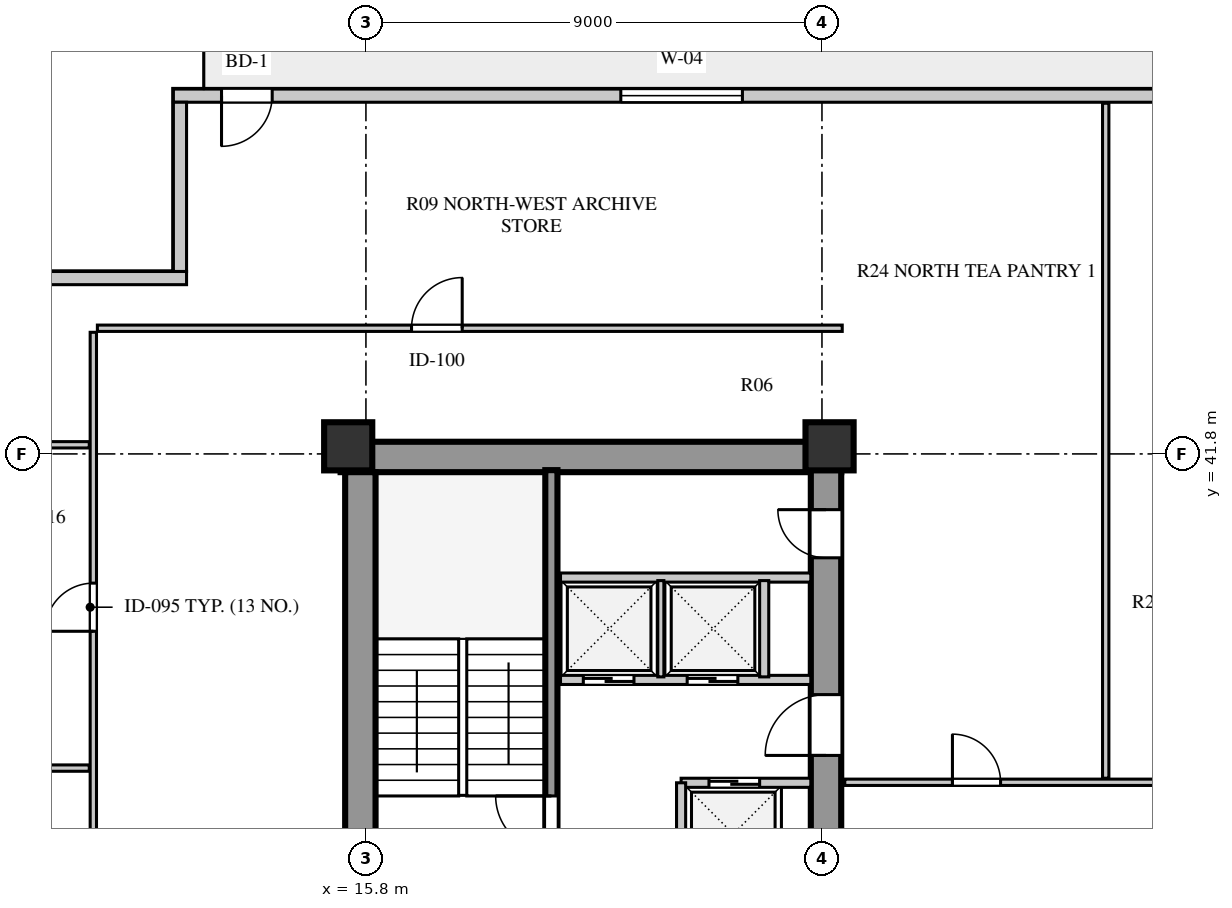
"""IFC4 building model, lengths in metres.
Left out: names, types, materials, properties, quantities, classifications, styles, units other than length and angle.
Written with IfcOpenShell. Run it as: python <this file> out.ifc"""

import sys

from ifc_helpers import new_model, si_unit, direction, frame, frame_2d, origin, origin_2d, place, context, subcontext, project, spatial, rectangle, extrude, element, fill, save


model = new_model("IFC4")
c1 = context("Model", 3, precision=1e-05, world=origin(), true_north=direction((0.0, 1.0)))
c2 = subcontext(c1, "Body", "Model", "MODEL_VIEW")
j1 = project(units=[si_unit("LENGTHUNIT", "METRE"), si_unit("PLANEANGLEUNIT", "RADIAN")], contexts=[c1])
p1 = place(None, origin())
s1 = spatial("IfcSite", under=j1, at=p1, CompositionType="ELEMENT")
p2 = place(p1, origin())
s2 = spatial("IfcBuilding", under=s1, at=p2, CompositionType="ELEMENT")
p3 = place(p2, frame((0.0, 0.0, 90.0)))
s3 = spatial("IfcBuildingStorey", under=s2, at=p3, CompositionType="ELEMENT", Elevation=90.0)
p4 = place(p3, frame((15.3, 41.74, 0.0), z_axis=(0.0, 0.0, 1.0), x_axis=(1.0, 0.0, 0.0)))
e1 = element("IfcWall", 1, at=p4, inside=s3, PredefinedType="SHEAR", context=c2, shape_type="SweptSolid", body=[
    extrude(rectangle(XDim=9.88, YDim=0.6, at=frame_2d((4.94, 0.0))), origin(), (0.0, 0.0, 1.0), 3.7),
])
p5 = place(p3, frame((15.69, 15.81, 0.0), z_axis=(0.0, 0.0, 1.0), x_axis=(0.0, 1.0, 0.0)))
e2 = element("IfcWall", 2, at=p5, inside=s3, PredefinedType="SHEAR", context=c2, shape_type="SweptSolid", body=[
    extrude(rectangle(XDim=25.63, YDim=0.6, at=frame_2d((12.815, 0.0))), origin(), (0.0, 0.0, 1.0), 3.7),
])
p6 = place(p3, frame((24.88, 15.74, 0.0), z_axis=(0.0, 0.0, 1.0), x_axis=(0.0, 1.0, 0.0)))
e3 = element("IfcWall", 3, at=p6, inside=s3, PredefinedType="SHEAR", context=c2, shape_type="SweptSolid", body=[
    extrude(rectangle(XDim=25.76, YDim=0.6, at=frame_2d((12.88, 0.0))), origin(), (0.0, 0.0, 1.0), 3.7),
])
p7 = place(p6, frame((1.61, 0.0, 0.0)))
e4 = element("IfcOpeningElement", 4, at=p7, cuts=e3, PredefinedType="OPENING", context=c2, shape_type="SweptSolid", body=[
    extrude(rectangle(XDim=1.2, YDim=2.1, at=frame_2d((0.6, 1.05))), frame((0.0, 0.31, 0.0), z_axis=(0.0, -1.0, 0.0), x_axis=(1.0, 0.0, 0.0)), (0.0, 0.0, 1.0), 0.62),
])
p8 = place(p6, frame((6.78, 0.0, 0.0)))
e5 = element("IfcOpeningElement", 5, at=p8, cuts=e3, PredefinedType="OPENING", context=c2, shape_type="SweptSolid", body=[
    extrude(rectangle(XDim=0.85, YDim=2.06, at=frame_2d((0.425, 1.03))), frame((0.0, 0.31, 0.0), z_axis=(0.0, -1.0, 0.0), x_axis=(1.0, 0.0, 0.0)), (0.0, 0.0, 1.0), 0.62),
])
p9 = place(p6, frame((12.11, 0.0, 0.0)))
e6 = element("IfcOpeningElement", 6, at=p9, cuts=e3, PredefinedType="OPENING", context=c2, shape_type="SweptSolid", body=[
    extrude(rectangle(XDim=1.5, YDim=2.12, at=frame_2d((0.75, 1.06))), frame((0.0, 0.31, 0.0), z_axis=(0.0, -1.0, 0.0), x_axis=(1.0, 0.0, 0.0)), (0.0, 0.0, 1.0), 0.62),
])
p10 = place(p6, frame((20.11, 0.0, 0.0)))
e7 = element("IfcOpeningElement", 7, at=p10, cuts=e3, PredefinedType="OPENING", context=c2, shape_type="SweptSolid", body=[
    extrude(rectangle(XDim=1.2, YDim=2.12, at=frame_2d((0.6, 1.06))), frame((0.0, 0.31, 0.0), z_axis=(0.0, -1.0, 0.0), x_axis=(1.0, 0.0, 0.0)), (0.0, 0.0, 1.0), 0.62),
])
p11 = place(p6, frame((24.01, 0.0, 0.0)))
e8 = element("IfcOpeningElement", 8, at=p11, cuts=e3, PredefinedType="OPENING", context=c2, shape_type="SweptSolid", body=[
    extrude(rectangle(XDim=0.95, YDim=2.1, at=frame_2d((0.475, 1.05))), frame((0.0, 0.31, 0.0), z_axis=(0.0, -1.0, 0.0), x_axis=(1.0, 0.0, 0.0)), (0.0, 0.0, 1.0), 0.62),
])
for number, where, z_axis, x_axis in (
    (9, (15.45, 41.95, 0.0), (0.0, 0.0, 1.0), (1.0, 0.0, 0.0)),
    (10, (24.95, 41.95, 0.0), (0.0, 0.0, 1.0), (1.0, 0.0, 0.0)),
):
    element("IfcColumn", number, at=place(p3, frame(where, z_axis=z_axis, x_axis=x_axis)), inside=s3, PredefinedType="COLUMN", context=c2, shape_type="SweptSolid", body=[
        extrude(rectangle(XDim=0.95, YDim=0.95, at=origin_2d()), origin(), (0.0, 0.0, 1.0), 3.7),
    ])
p12 = place(p3, frame((46.6, 48.87, 0.0), z_axis=(0.0, 0.0, 1.0), x_axis=(-1.0, 0.0, 0.0)))
e11 = element("IfcWall", 11, at=p12, inside=s3, PredefinedType="SOLIDWALL", context=c2, shape_type="SweptSolid", body=[
    extrude(rectangle(XDim=34.6, YDim=0.26, at=frame_2d((17.3, 0.0))), origin(), (0.0, 0.0, 1.0), 3.7),
])
p13 = place(p12, frame((32.65, 0.0, 0.0)))
e12 = element("IfcOpeningElement", 12, at=p13, cuts=e11, PredefinedType="OPENING", context=c2, shape_type="SweptSolid", body=[
    extrude(rectangle(XDim=1.0, YDim=2.05, at=frame_2d((0.5, 1.025))), frame((0.0, 0.14, 0.0), z_axis=(0.0, -1.0, 0.0), x_axis=(1.0, 0.0, 0.0)), (0.0, 0.0, 1.0), 0.28),
])
p14 = place(p12, frame((23.37, 0.0, 0.8)))
e13 = element("IfcOpeningElement", 13, at=p14, cuts=e11, PredefinedType="OPENING", context=c2, shape_type="SweptSolid", body=[
    extrude(rectangle(XDim=2.4, YDim=2.05, at=frame_2d((1.2, 1.025))), frame((0.0, 0.14, 0.0), z_axis=(0.0, -1.0, 0.0), x_axis=(1.0, 0.0, 0.0)), (0.0, 0.0, 1.0), 0.28),
])
p15 = place(p12, frame((7.105, 0.0, 0.8)))
e14 = element("IfcOpeningElement", 14, at=p15, cuts=e11, PredefinedType="OPENING", context=c2, shape_type="SweptSolid", body=[
    extrude(rectangle(XDim=2.1, YDim=1.95, at=frame_2d((1.05, 0.975))), frame((0.0, 0.14, 0.0), z_axis=(0.0, -1.0, 0.0), x_axis=(1.0, 0.0, 0.0)), (0.0, 0.0, 1.0), 0.28),
])
p16 = place(p3, frame((12.13, 48.74, 0.0), z_axis=(0.0, 0.0, 1.0), x_axis=(0.0, -1.0, 0.0)))
e15 = element("IfcWall", 15, at=p16, inside=s3, PredefinedType="SOLIDWALL", context=c2, shape_type="SweptSolid", body=[
    extrude(rectangle(XDim=3.34, YDim=0.26, at=frame_2d((1.67, 0.0))), origin(), (0.0, 0.0, 1.0), 3.7),
])
p17 = place(p3, frame((12.26, 45.27, 0.0), z_axis=(0.0, 0.0, 1.0), x_axis=(-1.0, 0.0, 0.0)))
e16 = element("IfcWall", 16, at=p17, inside=s3, PredefinedType="SOLIDWALL", context=c2, shape_type="SweptSolid", body=[
    extrude(rectangle(XDim=3.86, YDim=0.26, at=frame_2d((1.93, 0.0))), origin(), (0.0, 0.0, 1.0), 3.7),
])
p18 = place(p3, frame((19.46, 33.3, 0.0), z_axis=(0.0, 0.0, 1.0), x_axis=(0.0, 1.0, 0.0)))
e17 = element("IfcWall", 17, at=p18, inside=s3, PredefinedType="SHEAR", context=c2, shape_type="SweptSolid", body=[
    extrude(rectangle(XDim=8.18, YDim=0.24, at=frame_2d((4.09, 0.0))), origin(), (0.0, 0.0, 1.0), 4.0),
])
p19 = place(p18, frame((0.65, 0.0, 0.0)))
e18 = element("IfcOpeningElement", 18, at=p19, cuts=e17, PredefinedType="OPENING", context=c2, shape_type="SweptSolid", body=[
    extrude(rectangle(XDim=1.1, YDim=2.1, at=frame_2d((0.55, 1.05))), frame((0.0, 0.13, 0.0), z_axis=(0.0, -1.0, 0.0), x_axis=(1.0, 0.0, 0.0)), (0.0, 0.0, 1.0), 0.26),
])
p20 = place(p3, frame((22.02, 35.31, 0.0), z_axis=(0.0, 0.0, 1.0), x_axis=(1.0, 0.0, 0.0)))
e19 = element("IfcWall", 19, at=p20, inside=s3, PredefinedType="SOLIDWALL", context=c2, shape_type="SweptSolid", body=[
    extrude(rectangle(XDim=2.56, YDim=0.18, at=frame_2d((1.28, 0.0))), origin(), (0.0, 0.0, 1.0), 3.7),
])
p21 = place(p20, frame((0.55, 0.0, 0.0)))
e20 = element("IfcOpeningElement", 20, at=p21, cuts=e19, PredefinedType="OPENING", context=c2, shape_type="SweptSolid", body=[
    extrude(rectangle(XDim=1.0, YDim=2.1, at=frame_2d((0.5, 1.05))), frame((0.0, 0.1, 0.0), z_axis=(0.0, -1.0, 0.0), x_axis=(1.0, 0.0, 0.0)), (0.0, 0.0, 1.0), 0.2),
])
p22 = place(p3, frame((22.02, 33.3, 0.0), z_axis=(0.0, 0.0, 1.0), x_axis=(0.0, 1.0, 0.0)))
e21 = element("IfcWall", 21, at=p22, inside=s3, PredefinedType="SOLIDWALL", context=c2, shape_type="SweptSolid", body=[
    extrude(rectangle(XDim=2.01, YDim=0.18, at=frame_2d((1.005, 0.0))), origin(), (0.0, 0.0, 1.0), 3.7),
])
p23 = place(p3, frame((19.64, 37.34, 0.0), z_axis=(0.0, 0.0, 1.0), x_axis=(1.0, 0.0, 0.0)))
e22 = element("IfcWall", 22, at=p23, inside=s3, PredefinedType="SOLIDWALL", context=c2, shape_type="SweptSolid", body=[
    extrude(rectangle(XDim=4.94, YDim=0.18, at=frame_2d((2.47, 0.0))), origin(), (0.0, 0.0, 1.0), 3.7),
])
p24 = place(p23, frame((0.45, 0.0, 0.0)))
e23 = element("IfcOpeningElement", 23, at=p24, cuts=e22, PredefinedType="OPENING", context=c2, shape_type="SweptSolid", body=[
    extrude(rectangle(XDim=1.0, YDim=2.1, at=frame_2d((0.5, 1.05))), frame((0.0, 0.1, 0.0), z_axis=(0.0, -1.0, 0.0), x_axis=(1.0, 0.0, 0.0)), (0.0, 0.0, 1.0), 0.2),
])
p25 = place(p23, frame((2.5, 0.0, 0.0)))
e24 = element("IfcOpeningElement", 24, at=p25, cuts=e22, PredefinedType="OPENING", context=c2, shape_type="SweptSolid", body=[
    extrude(rectangle(XDim=1.0, YDim=2.1, at=frame_2d((0.5, 1.05))), frame((0.0, 0.1, 0.0), z_axis=(0.0, -1.0, 0.0), x_axis=(1.0, 0.0, 0.0)), (0.0, 0.0, 1.0), 0.2),
])
p26 = place(p3, frame((19.64, 39.36, 0.0), z_axis=(0.0, 0.0, 1.0), x_axis=(1.0, 0.0, 0.0)))
e25 = element("IfcWall", 25, at=p26, inside=s3, PredefinedType="SOLIDWALL", context=c2, shape_type="SweptSolid", body=[
    extrude(rectangle(XDim=4.94, YDim=0.18, at=frame_2d((2.47, 0.0))), origin(), (0.0, 0.0, 1.0), 3.7),
])
p27 = place(p3, frame((21.62, 37.4, 0.0), z_axis=(0.0, 0.0, 1.0), x_axis=(0.0, 1.0, 0.0)))
e26 = element("IfcWall", 26, at=p27, inside=s3, PredefinedType="PARTITIONING", context=c2, shape_type="SweptSolid", body=[
    extrude(rectangle(XDim=1.9, YDim=0.12, at=frame_2d((0.95, 0.0))), origin(), (0.0, 0.0, 1.0), 3.7),
])
p28 = place(p3, frame((23.66, 37.4, 0.0), z_axis=(0.0, 0.0, 1.0), x_axis=(0.0, 1.0, 0.0)))
e27 = element("IfcWall", 27, at=p28, inside=s3, PredefinedType="SOLIDWALL", context=c2, shape_type="SweptSolid", body=[
    extrude(rectangle(XDim=1.9, YDim=0.18, at=frame_2d((0.95, 0.0))), origin(), (0.0, 0.0, 1.0), 3.7),
])
p29 = place(p3, frame((25.25, 35.32, 0.0), z_axis=(0.0, 0.0, 1.0), x_axis=(1.0, 0.0, 0.0)))
e28 = element("IfcWall", 28, at=p29, inside=s3, PredefinedType="PLUMBINGWALL", context=c2, shape_type="SweptSolid", body=[
    extrude(rectangle(XDim=9.47, YDim=0.125, at=frame_2d((4.735, 0.0))), origin(), (0.0, 0.0, 1.0), 3.7),
])
p30 = place(p29, frame((2.125, 0.0, 0.0)))
e29 = element("IfcOpeningElement", 29, at=p30, cuts=e28, PredefinedType="OPENING", context=c2, shape_type="SweptSolid", body=[
    extrude(rectangle(XDim=0.95, YDim=2.08, at=frame_2d((0.475, 1.04))), frame((0.0, 0.073, 0.0), z_axis=(0.0, -1.0, 0.0), x_axis=(1.0, 0.0, 0.0)), (0.0, 0.0, 1.0), 0.145),
])
p31 = place(p29, frame((6.815, 0.0, 0.0)))
e30 = element("IfcOpeningElement", 30, at=p31, cuts=e28, PredefinedType="OPENING", context=c2, shape_type="SweptSolid", body=[
    extrude(rectangle(XDim=0.95, YDim=2.08, at=frame_2d((0.475, 1.04))), frame((0.0, 0.073, 0.0), z_axis=(0.0, -1.0, 0.0), x_axis=(1.0, 0.0, 0.0)), (0.0, 0.0, 1.0), 0.145),
])
p32 = place(p3, frame((10.42, 13.0, 0.0), z_axis=(0.0, 0.0, 1.0), x_axis=(0.0, 1.0, 0.0)))
e31 = element("IfcWall", 31, at=p32, inside=s3, PredefinedType="PLUMBINGWALL", context=c2, shape_type="SweptSolid", body=[
    extrude(rectangle(XDim=31.2, YDim=0.125, at=frame_2d((15.6, 0.0))), origin(), (0.0, 0.0, 1.0), 3.7),
])
p33 = place(p32, frame((5.0, 0.0, 0.0)))
e32 = element("IfcOpeningElement", 32, at=p33, cuts=e31, PredefinedType="OPENING", context=c2, shape_type="SweptSolid", body=[
    extrude(rectangle(XDim=0.95, YDim=2.08, at=frame_2d((0.475, 1.04))), frame((0.0, 0.073, 0.0), z_axis=(0.0, -1.0, 0.0), x_axis=(1.0, 0.0, 0.0)), (0.0, 0.0, 1.0), 0.145),
])
p34 = place(p32, frame((11.65, 0.0, 0.0)))
e33 = element("IfcOpeningElement", 33, at=p34, cuts=e31, PredefinedType="OPENING", context=c2, shape_type="SweptSolid", body=[
    extrude(rectangle(XDim=0.95, YDim=2.08, at=frame_2d((0.475, 1.04))), frame((0.0, 0.073, 0.0), z_axis=(0.0, -1.0, 0.0), x_axis=(1.0, 0.0, 0.0)), (0.0, 0.0, 1.0), 0.145),
])
p35 = place(p32, frame((18.65, 0.0, 0.0)))
e34 = element("IfcOpeningElement", 34, at=p35, cuts=e31, PredefinedType="OPENING", context=c2, shape_type="SweptSolid", body=[
    extrude(rectangle(XDim=0.95, YDim=2.08, at=frame_2d((0.475, 1.04))), frame((0.0, 0.073, 0.0), z_axis=(0.0, -1.0, 0.0), x_axis=(1.0, 0.0, 0.0)), (0.0, 0.0, 1.0), 0.145),
])
p36 = place(p32, frame((25.3, 0.0, 0.0)))
e35 = element("IfcOpeningElement", 35, at=p36, cuts=e31, PredefinedType="OPENING", context=c2, shape_type="SweptSolid", body=[
    extrude(rectangle(XDim=0.95, YDim=2.08, at=frame_2d((0.475, 1.04))), frame((0.0, 0.073, 0.0), z_axis=(0.0, -1.0, 0.0), x_axis=(1.0, 0.0, 0.0)), (0.0, 0.0, 1.0), 0.145),
])
p37 = place(p3, frame((8.68, 41.98, 0.0), z_axis=(0.0, 0.0, 1.0), x_axis=(1.0, 0.0, 0.0)))
e36 = element("IfcWall", 36, at=p37, inside=s3, PredefinedType="PLUMBINGWALL", context=c2, shape_type="SweptSolid", body=[
    extrude(rectangle(XDim=1.66, YDim=0.125, at=frame_2d((0.83, 0.0))), origin(), (0.0, 0.0, 1.0), 3.2),
])
p38 = place(p3, frame((10.5, 44.28, 0.0), z_axis=(0.0, 0.0, 1.0), x_axis=(1.0, 0.0, 0.0)))
e37 = element("IfcWall", 37, at=p38, inside=s3, PredefinedType="PLUMBINGWALL", context=c2, shape_type="SweptSolid", body=[
    extrude(rectangle(XDim=14.7, YDim=0.125, at=frame_2d((7.35, 0.0))), origin(), (0.0, 0.0, 1.0), 3.7),
])
p39 = place(p38, frame((6.2, 0.0, 0.0)))
e38 = element("IfcOpeningElement", 38, at=p39, cuts=e37, PredefinedType="OPENING", context=c2, shape_type="SweptSolid", body=[
    extrude(rectangle(XDim=1.0, YDim=2.08, at=frame_2d((0.5, 1.04))), frame((0.0, 0.073, 0.0), z_axis=(0.0, -1.0, 0.0), x_axis=(1.0, 0.0, 0.0)), (0.0, 0.0, 1.0), 0.145),
])
p40 = place(p3, frame((8.68, 35.6, 0.0), z_axis=(0.0, 0.0, 1.0), x_axis=(1.0, 0.0, 0.0)))
e39 = element("IfcWall", 39, at=p40, inside=s3, PredefinedType="PLUMBINGWALL", context=c2, shape_type="SweptSolid", body=[
    extrude(rectangle(XDim=1.66, YDim=0.125, at=frame_2d((0.83, 0.0))), origin(), (0.0, 0.0, 1.0), 3.7),
])
p41 = place(p3, frame((30.4, 35.4, 0.0), z_axis=(0.0, 0.0, 1.0), x_axis=(0.0, 1.0, 0.0)))
e40 = element("IfcWall", 40, at=p41, inside=s3, PredefinedType="PLUMBINGWALL", context=c2, shape_type="SweptSolid", body=[
    extrude(rectangle(XDim=13.32, YDim=0.125, at=frame_2d((6.66, 0.0))), origin(), (0.0, 0.0, 1.0), 3.7),
])
p42 = place(p13, frame((1.0, 0.0, 0.0), z_axis=(0.0, 0.0, 1.0), x_axis=(-1.0, 0.0, 0.0)))
e41 = element("IfcDoor", 41, at=p42, inside=s3, OperationType="SINGLE_SWING_LEFT", PredefinedType="DOOR", context=c2, shape_type="SweptSolid", body=[
    extrude(rectangle(XDim=1.0, YDim=2.05, at=frame_2d((0.5, 1.025))), frame((0.0, 0.025, 0.0), z_axis=(0.0, -1.0, 0.0), x_axis=(1.0, 0.0, 0.0)), (0.0, 0.0, 1.0), 0.05),
])
fill(e12, e41)
p43 = place(p14, origin())
e42 = element("IfcWindow", 42, at=p43, inside=s3, PartitioningType="SINGLE_PANEL", PredefinedType="WINDOW", context=c2, shape_type="SweptSolid", body=[
    extrude(rectangle(XDim=2.4, YDim=2.05, at=frame_2d((1.2, 1.025))), frame((0.0, 0.03, 0.0), z_axis=(0.0, -1.0, 0.0), x_axis=(1.0, 0.0, 0.0)), (0.0, 0.0, 1.0), 0.06),
])
fill(e13, e42)
p44 = place(p19, origin())
e43 = element("IfcDoor", 43, at=p44, inside=s3, OperationType="SINGLE_SWING_RIGHT", PredefinedType="DOOR", context=c2, shape_type="SweptSolid", body=[
    extrude(rectangle(XDim=1.1, YDim=2.1, at=frame_2d((0.55, 1.05))), frame((0.0, 0.025, 0.0), z_axis=(0.0, -1.0, 0.0), x_axis=(1.0, 0.0, 0.0)), (0.0, 0.0, 1.0), 0.05),
])
fill(e18, e43)
p45 = place(p10, frame((1.2, 0.0, 0.0), z_axis=(0.0, 0.0, 1.0), x_axis=(-1.0, 0.0, 0.0)))
e44 = element("IfcDoor", 44, at=p45, inside=s3, OperationType="SINGLE_SWING_RIGHT", PredefinedType="DOOR", context=c2, shape_type="SweptSolid", body=[
    extrude(rectangle(XDim=1.2, YDim=2.12, at=frame_2d((0.6, 1.06))), frame((0.0, 0.025, 0.0), z_axis=(0.0, -1.0, 0.0), x_axis=(1.0, 0.0, 0.0)), (0.0, 0.0, 1.0), 0.05),
])
fill(e7, e44)
p46 = place(p24, frame((1.0, 0.0, 0.0), z_axis=(0.0, 0.0, 1.0), x_axis=(-1.0, 0.0, 0.0)))
e45 = element("IfcDoor", 45, at=p46, inside=s3, OperationType="DOUBLE_DOOR_SLIDING", PredefinedType="DOOR", context=c2, shape_type="SweptSolid", body=[
    extrude(rectangle(XDim=1.0, YDim=2.1, at=frame_2d((0.5, 1.05))), frame((0.0, 0.025, 0.0), z_axis=(0.0, -1.0, 0.0), x_axis=(1.0, 0.0, 0.0)), (0.0, 0.0, 1.0), 0.05),
])
fill(e23, e45)
p47 = place(p25, frame((1.0, 0.0, 0.0), z_axis=(0.0, 0.0, 1.0), x_axis=(-1.0, 0.0, 0.0)))
e46 = element("IfcDoor", 46, at=p47, inside=s3, OperationType="DOUBLE_DOOR_SLIDING", PredefinedType="DOOR", context=c2, shape_type="SweptSolid", body=[
    extrude(rectangle(XDim=1.0, YDim=2.1, at=frame_2d((0.5, 1.05))), frame((0.0, 0.025, 0.0), z_axis=(0.0, -1.0, 0.0), x_axis=(1.0, 0.0, 0.0)), (0.0, 0.0, 1.0), 0.05),
])
fill(e24, e46)
p48 = place(p21, origin())
e47 = element("IfcDoor", 47, at=p48, inside=s3, OperationType="DOUBLE_DOOR_SLIDING", PredefinedType="DOOR", context=c2, shape_type="SweptSolid", body=[
    extrude(rectangle(XDim=1.0, YDim=2.1, at=frame_2d((0.5, 1.05))), frame((0.0, 0.025, 0.0), z_axis=(0.0, -1.0, 0.0), x_axis=(1.0, 0.0, 0.0)), (0.0, 0.0, 1.0), 0.05),
])
fill(e20, e47)
p49 = place(p11, frame((0.95, 0.0, 0.0), z_axis=(0.0, 0.0, 1.0), x_axis=(-1.0, 0.0, 0.0)))
e48 = element("IfcDoor", 48, at=p49, inside=s3, OperationType="SINGLE_SWING_LEFT", PredefinedType="DOOR", context=c2, shape_type="SweptSolid", body=[
    extrude(rectangle(XDim=0.95, YDim=2.1, at=frame_2d((0.475, 1.05))), frame((0.0, 0.025, 0.0), z_axis=(0.0, -1.0, 0.0), x_axis=(1.0, 0.0, 0.0)), (0.0, 0.0, 1.0), 0.05),
])
fill(e8, e48)
p50 = place(p39, origin())
e49 = element("IfcDoor", 49, at=p50, inside=s3, OperationType="SINGLE_SWING_RIGHT", PredefinedType="DOOR", context=c2, shape_type="SweptSolid", body=[
    extrude(rectangle(XDim=1.0, YDim=2.08, at=frame_2d((0.5, 1.04))), frame((0.0, 0.025, 0.0), z_axis=(0.0, -1.0, 0.0), x_axis=(1.0, 0.0, 0.0)), (0.0, 0.0, 1.0), 0.05),
])
fill(e38, e49)
p51 = place(p36, frame((0.95, 0.0, 0.0), z_axis=(0.0, 0.0, 1.0), x_axis=(-1.0, 0.0, 0.0)))
e50 = element("IfcDoor", 50, at=p51, inside=s3, OperationType="SINGLE_SWING_RIGHT", PredefinedType="DOOR", context=c2, shape_type="SweptSolid", body=[
    extrude(rectangle(XDim=0.95, YDim=2.08, at=frame_2d((0.475, 1.04))), frame((0.0, 0.025, 0.0), z_axis=(0.0, -1.0, 0.0), x_axis=(1.0, 0.0, 0.0)), (0.0, 0.0, 1.0), 0.05),
])
fill(e35, e50)
p52 = place(p30, origin())
e51 = element("IfcDoor", 51, at=p52, inside=s3, OperationType="SINGLE_SWING_LEFT", PredefinedType="DOOR", context=c2, shape_type="SweptSolid", body=[
    extrude(rectangle(XDim=0.95, YDim=2.08, at=frame_2d((0.475, 1.04))), frame((0.0, 0.025, 0.0), z_axis=(0.0, -1.0, 0.0), x_axis=(1.0, 0.0, 0.0)), (0.0, 0.0, 1.0), 0.05),
])
fill(e29, e51)
save(model, sys.argv[1])
